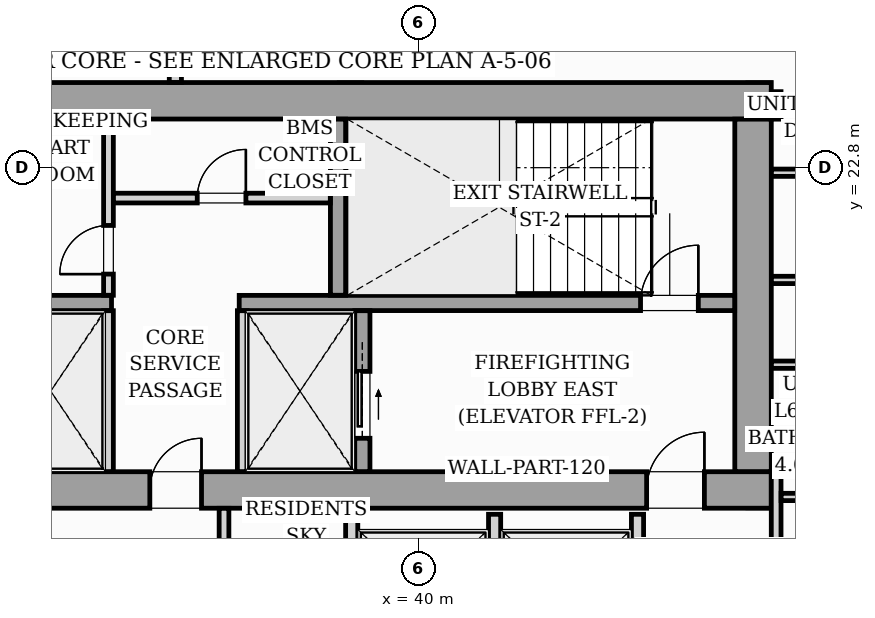
"""IFC4 building model, lengths in metres.
Left out: names, types, materials, properties, quantities, classifications, styles, units other than length and angle.
Written with IfcOpenShell. Run it as: python <this file> out.ifc"""

import sys

from ifc_helpers import new_model, si_unit, direction, frame, frame_2d, origin, origin_2d, place, context, subcontext, project, spatial, rectangle, i_section, extrude, source, transform, mapped, element, fill, save


model = new_model("IFC4")
c1 = context("Model", 3, precision=1e-05, world=origin(), true_north=direction((0.0, 1.0)))
c2 = subcontext(c1, "Body", "Model", "MODEL_VIEW")
j1 = project(units=[si_unit("LENGTHUNIT", "METRE"), si_unit("PLANEANGLEUNIT", "RADIAN")], contexts=[c1])
p1 = place(None, origin())
s1 = spatial("IfcSite", under=j1, at=p1, CompositionType="ELEMENT")
p2 = place(p1, origin())
s2 = spatial("IfcBuilding", under=s1, at=p2, CompositionType="ELEMENT")
p3 = place(p2, frame((0.0, 0.0, 239.7)))
s3 = spatial("IfcBuildingStorey", under=s2, at=p3, CompositionType="ELEMENT", Elevation=239.7)
m1 = source(origin(), c2, "Body", "SweptSolid", [
    extrude(i_section(OverallWidth=0.409, OverallDepth=0.425, WebThickness=0.033, FlangeThickness=0.052, FilletRadius=0.018, at=origin_2d()), origin(), (0.0, 0.0, 1.0), 3.296),
])
for number, where, z_axis, x_axis in (
    (1, (38.88, 17.4, 0.002), (0.0, 0.0, 1.0), (1.0, 0.0, 0.0)),
    (2, (45.6, 17.4, 0.002), (0.0, 0.0, 1.0), (1.0, 0.0, 0.0)),
    (3, (38.88, 24.0, 0.002), (0.0, 0.0, 1.0), (1.0, 0.0, 0.0)),
    (4, (45.6, 24.0, 0.002), (0.0, 0.0, 1.0), (1.0, 0.0, 0.0)),
):
    element("IfcColumn", number, at=place(p3, frame(where, z_axis=z_axis, x_axis=x_axis)), inside=s3, PredefinedType="PILASTER", context=c2, shape_type="MappedRepresentation", body=[
        mapped(m1, transform((0.0, 0.0, 0.0), scale=1.0)),
    ])
p4 = place(p3, frame((26.2, 17.5, 0.0), z_axis=(0.0, 0.0, 1.0), x_axis=(1.0, 0.0, 0.0)))
e5 = element("IfcWall", 5, at=p4, inside=s3, PredefinedType="SHEAR", context=c2, shape_type="SweptSolid", body=[
    extrude(rectangle(XDim=19.6, YDim=0.6, at=frame_2d((9.8, 0.0))), origin(), (0.0, 0.0, 1.0), 3.3),
])
p5 = place(p4, frame((0.95, 0.0, 0.0)))
e6 = element("IfcOpeningElement", 6, at=p5, cuts=e5, PredefinedType="OPENING", context=c2, shape_type="SweptSolid", body=[
    extrude(rectangle(XDim=0.95, YDim=2.06, at=frame_2d((0.475, 1.03))), frame((0.0, 0.31, 0.0), z_axis=(0.0, -1.0, 0.0), x_axis=(1.0, 0.0, 0.0)), (0.0, 0.0, 1.0), 0.62),
])
p6 = place(p4, frame((9.38, 0.0, 0.0)))
e7 = element("IfcOpeningElement", 7, at=p6, cuts=e5, PredefinedType="OPENING", context=c2, shape_type="SweptSolid", body=[
    extrude(rectangle(XDim=0.85, YDim=2.0, at=frame_2d((0.425, 1.0))), frame((0.0, 0.31, 0.0), z_axis=(0.0, -1.0, 0.0), x_axis=(1.0, 0.0, 0.0)), (0.0, 0.0, 1.0), 0.62),
])
p7 = place(p4, frame((17.55, 0.0, 0.0)))
e8 = element("IfcOpeningElement", 8, at=p7, cuts=e5, PredefinedType="OPENING", context=c2, shape_type="SweptSolid", body=[
    extrude(rectangle(XDim=0.95, YDim=2.06, at=frame_2d((0.475, 1.03))), frame((0.0, 0.31, 0.0), z_axis=(0.0, -1.0, 0.0), x_axis=(1.0, 0.0, 0.0)), (0.0, 0.0, 1.0), 0.62),
])
p8 = place(p3, frame((26.2, 23.9, 0.0), z_axis=(0.0, 0.0, 1.0), x_axis=(1.0, 0.0, 0.0)))
e9 = element("IfcWall", 9, at=p8, inside=s3, PredefinedType="SHEAR", context=c2, shape_type="SweptSolid", body=[
    extrude(rectangle(XDim=19.6, YDim=0.6, at=frame_2d((9.8, 0.0))), origin(), (0.0, 0.0, 1.0), 3.3),
])
p9 = place(p3, frame((45.5, 17.802, 0.0), z_axis=(0.0, 0.0, 1.0), x_axis=(0.0, 1.0, 0.0)))
e10 = element("IfcWall", 10, at=p9, inside=s3, PredefinedType="SHEAR", context=c2, shape_type="SweptSolid", body=[
    extrude(rectangle(XDim=5.796, YDim=0.6, at=frame_2d((2.898, 0.0))), origin(), (0.0, 0.0, 1.0), 3.3),
])
p10 = place(p3, frame((26.802, 20.575, 0.0), z_axis=(0.0, 0.0, 1.0), x_axis=(1.0, 0.0, 0.0)))
e11 = element("IfcWall", 11, at=p10, inside=s3, PredefinedType="SOLIDWALL", context=c2, shape_type="SweptSolid", body=[
    extrude(rectangle(XDim=8.148, YDim=0.25, at=frame_2d((4.074, 0.0))), origin(), (0.0, 0.0, 1.0), 3.3),
])
p11 = place(p10, frame((0.298, 0.0, 0.0)))
e12 = element("IfcOpeningElement", 12, at=p11, cuts=e11, PredefinedType="OPENING", context=c2, shape_type="SweptSolid", body=[
    extrude(rectangle(XDim=0.95, YDim=2.06, at=frame_2d((0.475, 1.03))), frame((0.0, 0.135, 0.0), z_axis=(0.0, -1.0, 0.0), x_axis=(1.0, 0.0, 0.0)), (0.0, 0.0, 1.0), 0.27),
])
p12 = place(p3, frame((37.05, 20.575, 0.0), z_axis=(0.0, 0.0, 1.0), x_axis=(1.0, 0.0, 0.0)))
e13 = element("IfcWall", 13, at=p12, inside=s3, PredefinedType="SOLIDWALL", context=c2, shape_type="SweptSolid", body=[
    extrude(rectangle(XDim=8.148, YDim=0.25, at=frame_2d((4.074, 0.0))), origin(), (0.0, 0.0, 1.0), 3.3),
])
p13 = place(p12, frame((6.6, 0.0, 0.0)))
e14 = element("IfcOpeningElement", 14, at=p13, cuts=e13, PredefinedType="OPENING", context=c2, shape_type="SweptSolid", body=[
    extrude(rectangle(XDim=0.95, YDim=2.06, at=frame_2d((0.475, 1.03))), frame((0.0, 0.135, 0.0), z_axis=(0.0, -1.0, 0.0), x_axis=(1.0, 0.0, 0.0)), (0.0, 0.0, 1.0), 0.27),
])
p14 = place(p3, frame((38.675, 20.702, 0.0), z_axis=(0.0, 0.0, 1.0), x_axis=(0.0, 1.0, 0.0)))
e15 = element("IfcWall", 15, at=p14, inside=s3, PredefinedType="SOLIDWALL", context=c2, shape_type="SweptSolid", body=[
    extrude(rectangle(XDim=2.896, YDim=0.25, at=frame_2d((1.448, 0.0))), origin(), (0.0, 0.0, 1.0), 3.3),
])
for number, where, z_axis, x_axis in (
    (16, (34.9, 17.802, 0.0), (0.0, 0.0, 1.0), (0.0, 1.0, 0.0)),
    (17, (37.1, 17.802, 0.0), (0.0, 0.0, 1.0), (0.0, 1.0, 0.0)),
):
    element("IfcWall", number, at=place(p3, frame(where, z_axis=z_axis, x_axis=x_axis)), inside=s3, PredefinedType="PARTITIONING", context=c2, shape_type="SweptSolid", body=[
        extrude(rectangle(XDim=2.646, YDim=0.16, at=frame_2d((1.323, 0.0))), origin(), (0.0, 0.0, 1.0), 3.04),
    ])
p15 = place(p3, frame((39.075, 17.802, 0.0), z_axis=(0.0, 0.0, 1.0), x_axis=(0.0, 1.0, 0.0)))
e18 = element("IfcWall", 18, at=p15, inside=s3, PredefinedType="SOLIDWALL", context=c2, shape_type="SweptSolid", body=[
    extrude(rectangle(XDim=2.646, YDim=0.25, at=frame_2d((1.323, 0.0))), origin(), (0.0, 0.0, 1.0), 3.3),
])
p16 = place(p15, frame((0.548, 0.0, 0.0)))
e19 = element("IfcOpeningElement", 19, at=p16, cuts=e18, PredefinedType="OPENING", context=c2, shape_type="SweptSolid", body=[
    extrude(rectangle(XDim=1.1, YDim=2.08, at=frame_2d((0.55, 1.04))), frame((0.0, 0.135, 0.0), z_axis=(0.0, -1.0, 0.0), x_axis=(1.0, 0.0, 0.0)), (0.0, 0.0, 1.0), 0.27),
])
p17 = place(p3, frame((34.9, 20.702, 0.0), z_axis=(0.0, 0.0, 1.0), x_axis=(0.0, 1.0, 0.0)))
e20 = element("IfcWall", 20, at=p17, inside=s3, PredefinedType="PARTITIONING", context=c2, shape_type="SweptSolid", body=[
    extrude(rectangle(XDim=2.896, YDim=0.16, at=frame_2d((1.448, 0.0))), origin(), (0.0, 0.0, 1.0), 3.04),
])
p18 = place(p17, frame((0.348, 0.0, 0.0)))
e21 = element("IfcOpeningElement", 21, at=p18, cuts=e20, PredefinedType="OPENING", context=c2, shape_type="SweptSolid", body=[
    extrude(rectangle(XDim=0.8, YDim=2.05, at=frame_2d((0.4, 1.025))), frame((0.0, 0.09, 0.0), z_axis=(0.0, -1.0, 0.0), x_axis=(1.0, 0.0, 0.0)), (0.0, 0.0, 1.0), 0.18),
])
p19 = place(p3, frame((34.982, 22.3, 0.0), z_axis=(0.0, 0.0, 1.0), x_axis=(1.0, 0.0, 0.0)))
e22 = element("IfcWall", 22, at=p19, inside=s3, PredefinedType="PARTITIONING", context=c2, shape_type="SweptSolid", body=[
    extrude(rectangle(XDim=3.566, YDim=0.16, at=frame_2d((1.783, 0.0))), origin(), (0.0, 0.0, 1.0), 3.04),
])
p20 = place(p19, frame((1.378, 0.0, 0.0)))
e23 = element("IfcOpeningElement", 23, at=p20, cuts=e22, PredefinedType="OPENING", context=c2, shape_type="SweptSolid", body=[
    extrude(rectangle(XDim=0.8, YDim=2.05, at=frame_2d((0.4, 1.025))), frame((0.0, 0.09, 0.0), z_axis=(0.0, -1.0, 0.0), x_axis=(1.0, 0.0, 0.0)), (0.0, 0.0, 1.0), 0.18),
])
for number, where, z_axis, x_axis in (
    (24, (38.9, 14.75, 0.0), (0.0, 0.0, 1.0), (0.0, 1.0, 0.0)),
    (25, (41.25, 14.75, 0.0), (0.0, 0.0, 1.0), (0.0, 1.0, 0.0)),
    (26, (43.6, 14.75, 0.0), (0.0, 0.0, 1.0), (0.0, 1.0, 0.0)),
):
    element("IfcWall", number, at=place(p3, frame(where, z_axis=z_axis, x_axis=x_axis)), inside=s3, PredefinedType="PARTITIONING", context=c2, shape_type="SweptSolid", body=[
        extrude(rectangle(XDim=2.35, YDim=0.2, at=frame_2d((1.175, 0.0))), origin(), (0.0, 0.0, 1.0), 3.04),
    ])
p21 = place(p3, frame((45.88, 13.442, 0.0), z_axis=(0.0, 0.0, 1.0), x_axis=(0.0, 1.0, 0.0)))
e27 = element("IfcWall", 27, at=p21, inside=s3, PredefinedType="PARTITIONING", context=c2, shape_type="SweptSolid", body=[
    extrude(rectangle(XDim=4.36, YDim=0.16, at=frame_2d((2.18, 0.0))), origin(), (0.0, 0.0, 1.0), 3.04),
])
p22 = place(p21, frame((0.493, 0.0, 0.0)))
e28 = element("IfcOpeningElement", 28, at=p22, cuts=e27, PredefinedType="OPENING", context=c2, shape_type="SweptSolid", body=[
    extrude(rectangle(XDim=0.95, YDim=2.06, at=frame_2d((0.475, 1.03))), frame((0.0, 0.09, 0.0), z_axis=(0.0, -1.0, 0.0), x_axis=(1.0, 0.0, 0.0)), (0.0, 0.0, 1.0), 0.18),
])
p23 = place(p3, frame((45.88, 23.598, 0.0), z_axis=(0.0, 0.0, 1.0), x_axis=(0.0, 1.0, 0.0)))
e29 = element("IfcWall", 29, at=p23, inside=s3, PredefinedType="PARTITIONING", context=c2, shape_type="SweptSolid", body=[
    extrude(rectangle(XDim=0.452, YDim=0.16, at=frame_2d((0.226, 0.0))), origin(), (0.0, 0.0, 1.0), 3.04),
])
p24 = place(p3, frame((36.0, 24.202, 0.0), z_axis=(0.0, 0.0, 1.0), x_axis=(0.0, 1.0, 0.0)))
e30 = element("IfcWall", 30, at=p24, inside=s3, PredefinedType="PARTITIONING", context=c2, shape_type="SweptSolid", body=[
    extrude(rectangle(XDim=2.363, YDim=0.2, at=frame_2d((1.182, 0.0))), origin(), (0.0, 0.0, 1.0), 3.04),
])
p25 = place(p3, frame((45.962, 17.385, 0.0), z_axis=(0.0, 0.0, 1.0), x_axis=(1.0, 0.0, 0.0)))
e31 = element("IfcWall", 31, at=p25, inside=s3, PredefinedType="PARTITIONING", context=c2, shape_type="SweptSolid", body=[
    extrude(rectangle(XDim=2.256, YDim=0.12, at=frame_2d((1.128, 0.0))), origin(), (0.0, 0.0, 1.0), 2.381),
])
p26 = place(p3, frame((45.802, 19.56, 0.0), z_axis=(0.0, 0.0, 1.0), x_axis=(1.0, 0.0, 0.0)))
e32 = element("IfcWall", 32, at=p26, inside=s3, PredefinedType="PARTITIONING", context=c2, shape_type="SweptSolid", body=[
    extrude(rectangle(XDim=2.416, YDim=0.12, at=frame_2d((1.208, 0.0))), origin(), (0.0, 0.0, 1.0), 3.04),
])
p27 = place(p3, frame((45.802, 22.717, 0.0), z_axis=(0.0, 0.0, 1.0), x_axis=(1.0, 0.0, 0.0)))
e33 = element("IfcWall", 33, at=p27, inside=s3, PredefinedType="PARTITIONING", context=c2, shape_type="SweptSolid", body=[
    extrude(rectangle(XDim=9.406, YDim=0.12, at=frame_2d((4.703, 0.0))), origin(), (0.0, 0.0, 1.0), 3.04),
])
p28 = place(p27, frame((4.397, 0.0, 0.0)))
e34 = element("IfcOpeningElement", 34, at=p28, cuts=e33, PredefinedType="OPENING", context=c2, shape_type="SweptSolid", body=[
    extrude(rectangle(XDim=0.85, YDim=2.05, at=frame_2d((0.425, 1.025))), frame((0.0, 0.07, 0.0), z_axis=(0.0, -1.0, 0.0), x_axis=(1.0, 0.0, 0.0)), (0.0, 0.0, 1.0), 0.14),
])
p29 = place(p3, frame((45.802, 20.954, 0.0), z_axis=(0.0, 0.0, 1.0), x_axis=(1.0, 0.0, 0.0)))
e35 = element("IfcWall", 35, at=p29, inside=s3, PredefinedType="PARTITIONING", context=c2, shape_type="SweptSolid", body=[
    extrude(rectangle(XDim=10.683, YDim=0.12, at=frame_2d((5.342, 0.0))), origin(), (0.0, 0.0, 1.0), 3.04),
])
p30 = place(p29, frame((5.062, 0.0, 0.0)))
e36 = element("IfcOpeningElement", 36, at=p30, cuts=e35, PredefinedType="OPENING", context=c2, shape_type="SweptSolid", body=[
    extrude(rectangle(XDim=0.85, YDim=2.05, at=frame_2d((0.425, 1.025))), frame((0.0, 0.07, 0.0), z_axis=(0.0, -1.0, 0.0), x_axis=(1.0, 0.0, 0.0)), (0.0, 0.0, 1.0), 0.14),
])
p31 = place(p3, frame((36.8, 14.7, 0.0), z_axis=(0.0, 0.0, 1.0), x_axis=(0.0, 1.0, 0.0)))
e37 = element("IfcWall", 37, at=p31, inside=s3, PredefinedType="PARTITIONING", context=c2, shape_type="SweptSolid", body=[
    extrude(rectangle(XDim=2.498, YDim=0.16, at=frame_2d((1.249, 0.0))), origin(), (0.0, 0.0, 1.0), 3.04),
])
m2 = source(origin(), c2, "Body", "SweptSolid", [
    extrude(rectangle(XDim=0.85, YDim=2.0, at=frame_2d((0.425, 1.0))), frame((0.0, 0.025, 0.0), z_axis=(0.0, -1.0, 0.0), x_axis=(1.0, 0.0, 0.0)), (0.0, 0.0, 1.0), 0.05),
])
p32 = place(p6, origin())
e38 = element("IfcDoor", 38, at=p32, inside=s3, OperationType="SINGLE_SWING_RIGHT", PredefinedType="DOOR", context=c2, shape_type="MappedRepresentation", body=[
    mapped(m2, transform((0.0, 0.0, 0.0), scale=1.0)),
])
fill(e7, e38)
m3 = source(origin(), c2, "Body", "SweptSolid", [
    extrude(rectangle(XDim=0.95, YDim=2.06, at=frame_2d((0.475, 1.03))), frame((0.0, 0.025, 0.0), z_axis=(0.0, -1.0, 0.0), x_axis=(1.0, 0.0, 0.0)), (0.0, 0.0, 1.0), 0.05),
])
p33 = place(p7, origin())
e39 = element("IfcDoor", 39, at=p33, inside=s3, OperationType="SINGLE_SWING_RIGHT", PredefinedType="DOOR", context=c2, shape_type="MappedRepresentation", body=[
    mapped(m3, transform((0.0, 0.0, 0.0), scale=1.0)),
])
fill(e8, e39)
p34 = place(p13, origin())
e40 = element("IfcDoor", 40, at=p34, inside=s3, OperationType="SINGLE_SWING_RIGHT", PredefinedType="DOOR", context=c2, shape_type="MappedRepresentation", body=[
    mapped(m3, transform((0.0, 0.0, 0.0), scale=1.0)),
])
fill(e14, e40)
m4 = source(origin(), c2, "Body", "SweptSolid", [
    extrude(rectangle(XDim=1.1, YDim=2.08, at=frame_2d((0.55, 1.04))), frame((0.0, 0.025, 0.0), z_axis=(0.0, -1.0, 0.0), x_axis=(1.0, 0.0, 0.0)), (0.0, 0.0, 1.0), 0.05),
])
p35 = place(p16, origin())
e41 = element("IfcDoor", 41, at=p35, inside=s3, OperationType="SLIDING_TO_RIGHT", PredefinedType="DOOR", context=c2, shape_type="MappedRepresentation", body=[
    mapped(m4, transform((0.0, 0.0, 0.0), scale=1.0)),
])
fill(e19, e41)
m5 = source(origin(), c2, "Body", "SweptSolid", [
    extrude(rectangle(XDim=0.8, YDim=2.05, at=frame_2d((0.4, 1.025))), frame((0.0, 0.025, 0.0), z_axis=(0.0, -1.0, 0.0), x_axis=(1.0, 0.0, 0.0)), (0.0, 0.0, 1.0), 0.05),
])
p36 = place(p18, origin())
e42 = element("IfcDoor", 42, at=p36, inside=s3, OperationType="SINGLE_SWING_LEFT", PredefinedType="DOOR", context=c2, shape_type="MappedRepresentation", body=[
    mapped(m5, transform((0.0, 0.0, 0.0), scale=1.0)),
])
fill(e21, e42)
p37 = place(p20, origin())
e43 = element("IfcDoor", 43, at=p37, inside=s3, OperationType="SINGLE_SWING_RIGHT", PredefinedType="DOOR", context=c2, shape_type="MappedRepresentation", body=[
    mapped(m5, transform((0.0, 0.0, 0.0), scale=1.0)),
])
fill(e23, e43)
save(model, sys.argv[1])
